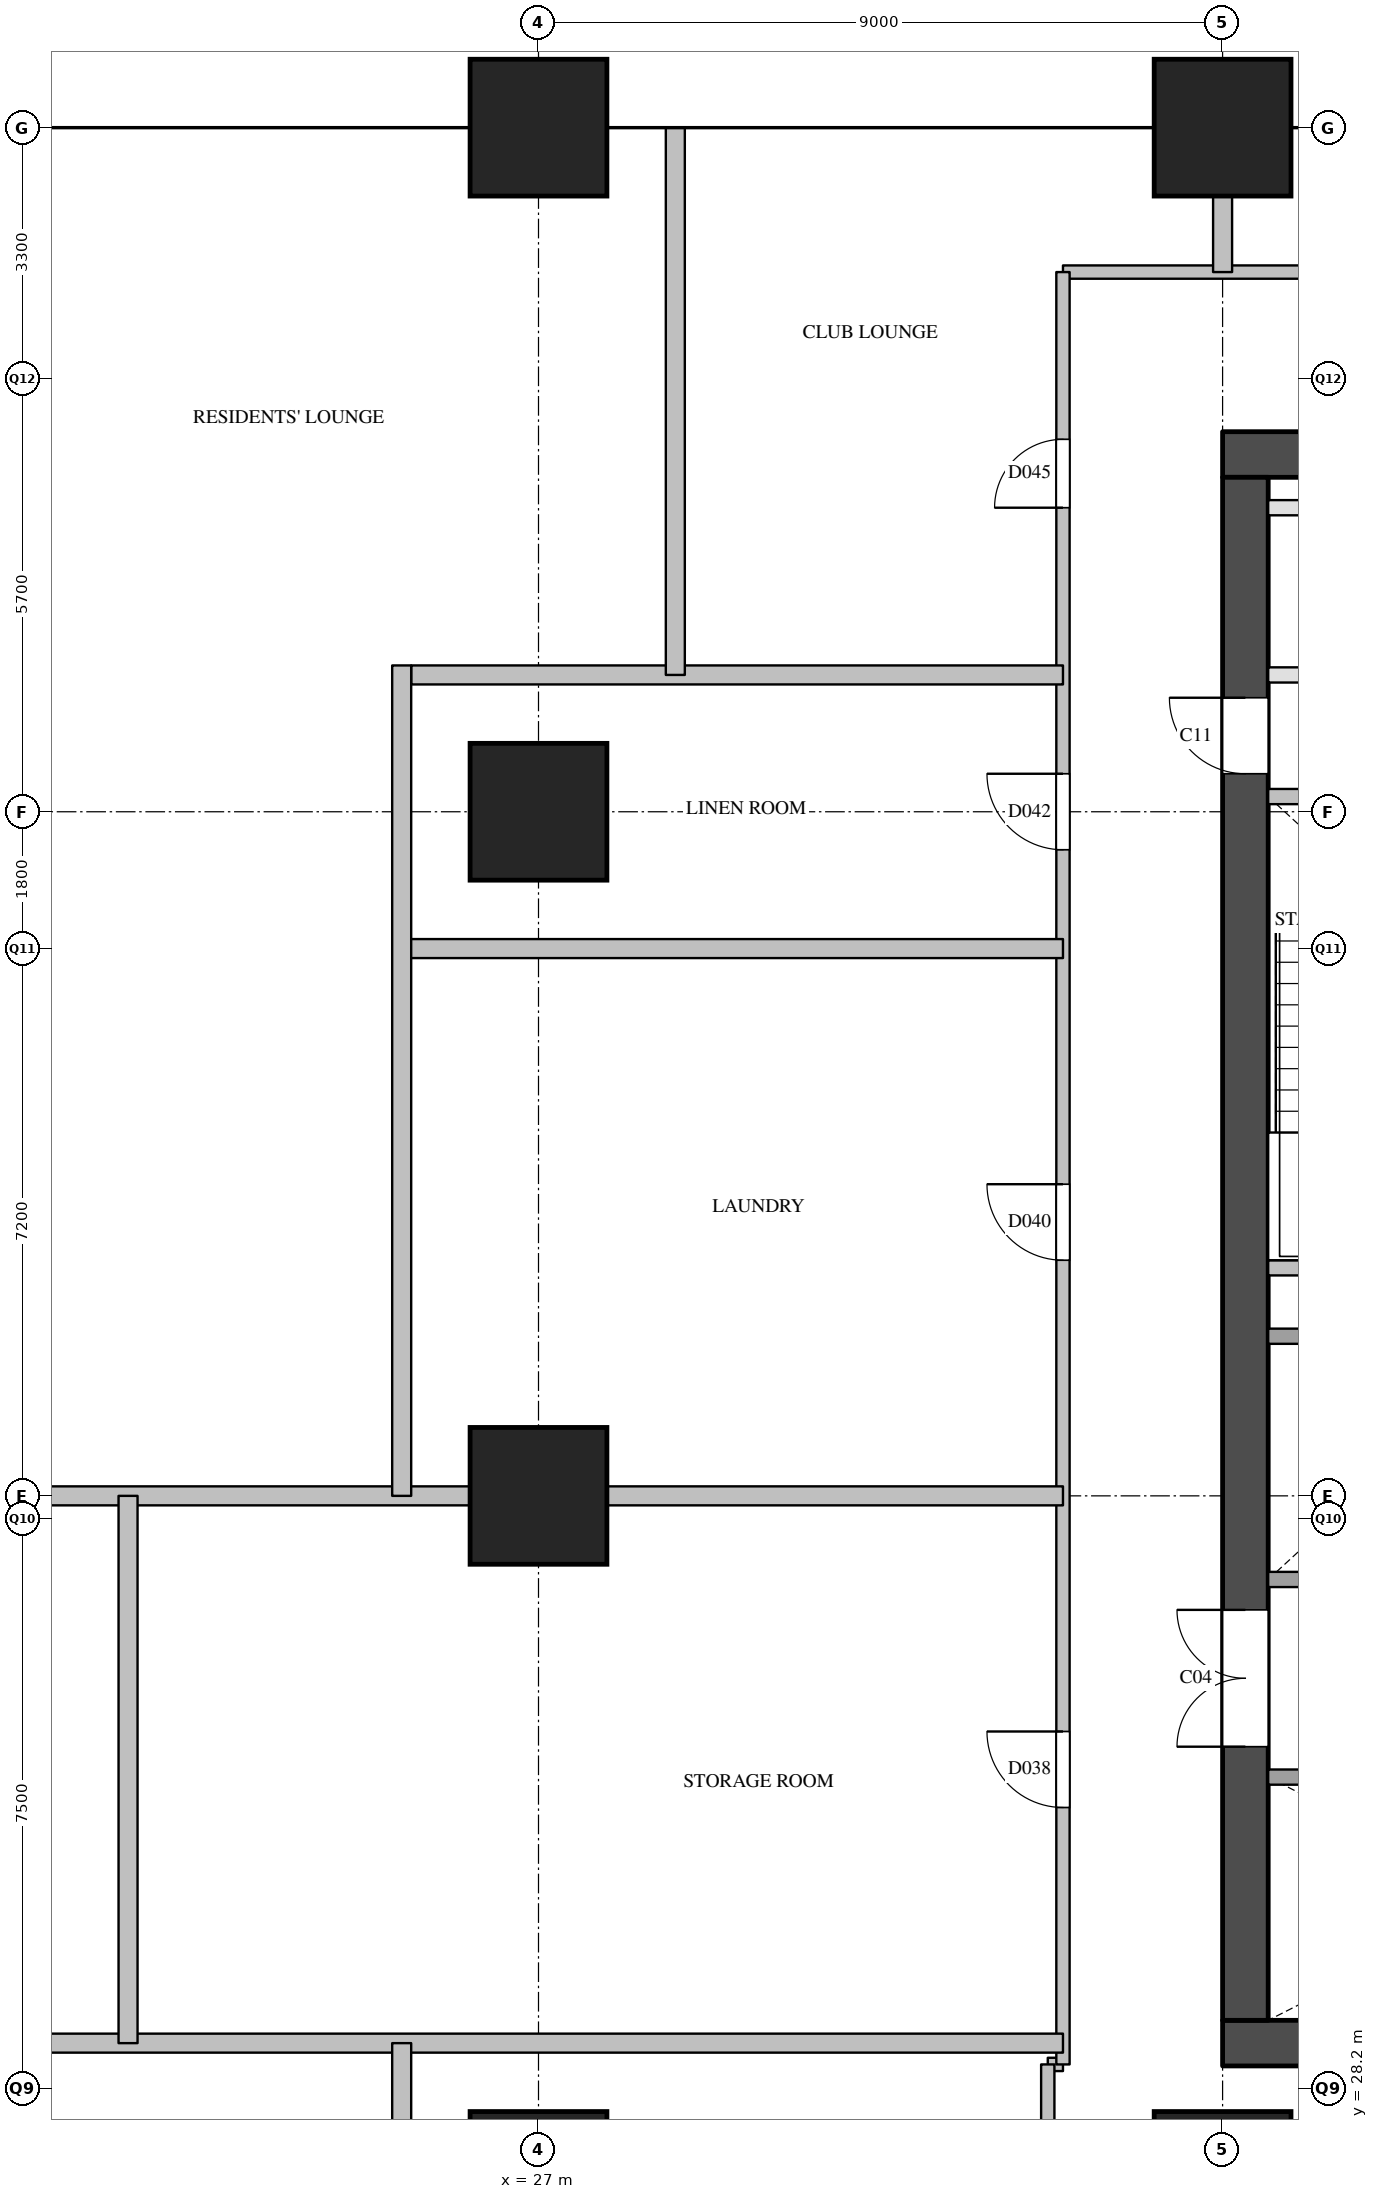
"""IFC4 building model, lengths in metres.
Left out: names, types, materials, properties, quantities, classifications, styles, units other than length and angle.
Written with IfcOpenShell. Run it as: python <this file> out.ifc"""

import sys

from ifc_helpers import new_model, si_unit, direction, frame, frame_2d, origin, origin_2d, place, context, subcontext, project, spatial, rectangle, extrude, element, fill, save


model = new_model("IFC4")
c1 = context("Model", 3, precision=1e-05, world=origin(), true_north=direction((0.0, 1.0)))
c2 = subcontext(c1, "Body", "Model", "MODEL_VIEW")
j1 = project(units=[si_unit("LENGTHUNIT", "METRE"), si_unit("PLANEANGLEUNIT", "RADIAN")], contexts=[c1])
p1 = place(None, origin())
s1 = spatial("IfcSite", under=j1, at=p1, CompositionType="ELEMENT")
p2 = place(p1, origin())
s2 = spatial("IfcBuilding", under=s1, at=p2, CompositionType="ELEMENT")
p3 = place(p2, frame((0.0, 0.0, 69.0)))
s3 = spatial("IfcBuildingStorey", under=s2, at=p3, CompositionType="ELEMENT", Elevation=69.0)
for number, where, z_axis, x_axis in (
    (1, (27.0, 27.0, 0.0), (0.0, 0.0, 1.0), (1.0, 0.0, 0.0)),
    (2, (27.0, 36.0, 0.0), (0.0, 0.0, 1.0), (1.0, 0.0, 0.0)),
    (3, (27.0, 45.0, 0.0), (0.0, 0.0, 1.0), (1.0, 0.0, 0.0)),
    (4, (27.0, 54.0, 0.0), (0.0, 0.0, 1.0), (1.0, 0.0, 0.0)),
    (5, (36.0, 27.0, 0.0), (0.0, 0.0, 1.0), (1.0, 0.0, 0.0)),
    (6, (36.0, 54.0, 0.0), (0.0, 0.0, 1.0), (1.0, 0.0, 0.0)),
):
    element("IfcColumn", number, at=place(p3, frame(where, z_axis=z_axis, x_axis=x_axis)), inside=s3, PredefinedType="COLUMN", context=c2, shape_type="SweptSolid", body=[
        extrude(rectangle(XDim=1.8, YDim=1.8, at=origin_2d()), origin(), (0.0, 0.0, 1.0), 3.8),
    ])
for number, where, z_axis, x_axis in (
    (7, (36.0, 28.8, 0.0), (0.0, 0.0, 1.0), (1.0, 0.0, 0.0)),
    (8, (36.0, 49.7, 0.0), (0.0, 0.0, 1.0), (1.0, 0.0, 0.0)),
):
    element("IfcWall", number, at=place(p3, frame(where, z_axis=z_axis, x_axis=x_axis)), inside=s3, PredefinedType="SHEAR", context=c2, shape_type="SweptSolid", body=[
        extrude(rectangle(XDim=12.4, YDim=0.6, at=frame_2d((6.2, 0.0))), origin(), (0.0, 0.0, 1.0), 3.5),
    ])
p4 = place(p3, frame((36.3, 29.1, 0.0), z_axis=(0.0, 0.0, 1.0), x_axis=(0.0, 1.0, 0.0)))
e9 = element("IfcWall", 9, at=p4, inside=s3, PredefinedType="SHEAR", context=c2, shape_type="SweptSolid", body=[
    extrude(rectangle(XDim=20.3, YDim=0.6, at=frame_2d((10.15, 0.0))), origin(), (0.0, 0.0, 1.0), 3.5),
])
p5 = place(p4, frame((3.6, 0.0, 0.0)))
e10 = element("IfcOpeningElement", 10, at=p5, cuts=e9, PredefinedType="OPENING", context=c2, shape_type="SweptSolid", body=[
    extrude(rectangle(XDim=1.8, YDim=2.1, at=frame_2d((0.9, 1.05))), frame((0.0, 0.31, 0.0), z_axis=(0.0, -1.0, 0.0), x_axis=(1.0, 0.0, 0.0)), (0.0, 0.0, 1.0), 0.62),
])
p6 = place(p4, frame((16.4, 0.0, 0.0)))
e11 = element("IfcOpeningElement", 11, at=p6, cuts=e9, PredefinedType="OPENING", context=c2, shape_type="SweptSolid", body=[
    extrude(rectangle(XDim=1.0, YDim=2.1, at=frame_2d((0.5, 1.05))), frame((0.0, 0.31, 0.0), z_axis=(0.0, -1.0, 0.0), x_axis=(1.0, 0.0, 0.0)), (0.0, 0.0, 1.0), 0.62),
])
p7 = place(p3, frame((36.6, 32.3, 0.0), z_axis=(0.0, 0.0, 1.0), x_axis=(1.0, 0.0, 0.0)))
e12 = element("IfcWall", 12, at=p7, inside=s3, PredefinedType="SOLIDWALL", context=c2, shape_type="SweptSolid", body=[
    extrude(rectangle(XDim=11.2, YDim=0.2, at=frame_2d((5.6, 0.0))), origin(), (0.0, 0.0, 1.0), 3.5),
])
p8 = place(p7, frame((7.225, 0.0, 0.0)))
e13 = element("IfcOpeningElement", 13, at=p8, cuts=e12, PredefinedType="OPENING", context=c2, shape_type="SweptSolid", body=[
    extrude(rectangle(XDim=1.2, YDim=2.1, at=frame_2d((0.6, 1.05))), frame((0.0, 0.11, 0.0), z_axis=(0.0, -1.0, 0.0), x_axis=(1.0, 0.0, 0.0)), (0.0, 0.0, 1.0), 0.22),
])
p9 = place(p7, frame((9.475, 0.0, 0.0)))
e14 = element("IfcOpeningElement", 14, at=p9, cuts=e12, PredefinedType="OPENING", context=c2, shape_type="SweptSolid", body=[
    extrude(rectangle(XDim=1.2, YDim=2.1, at=frame_2d((0.6, 1.05))), frame((0.0, 0.11, 0.0), z_axis=(0.0, -1.0, 0.0), x_axis=(1.0, 0.0, 0.0)), (0.0, 0.0, 1.0), 0.22),
])
p10 = place(p3, frame((36.6, 34.9, 0.0), z_axis=(0.0, 0.0, 1.0), x_axis=(1.0, 0.0, 0.0)))
e15 = element("IfcWall", 15, at=p10, inside=s3, PredefinedType="SOLIDWALL", context=c2, shape_type="SweptSolid", body=[
    extrude(rectangle(XDim=6.3, YDim=0.2, at=frame_2d((3.15, 0.0))), origin(), (0.0, 0.0, 1.0), 3.5),
])
p11 = place(p3, frame((36.6, 38.1, 0.0), z_axis=(0.0, 0.0, 1.0), x_axis=(1.0, 0.0, 0.0)))
e16 = element("IfcWall", 16, at=p11, inside=s3, PredefinedType="SOLIDWALL", context=c2, shape_type="SweptSolid", body=[
    extrude(rectangle(XDim=6.7, YDim=0.2, at=frame_2d((3.35, 0.0))), origin(), (0.0, 0.0, 1.0), 3.5),
])
p12 = place(p3, frame((36.6, 39.0, 0.0), z_axis=(0.0, 0.0, 1.0), x_axis=(1.0, 0.0, 0.0)))
e17 = element("IfcWall", 17, at=p12, inside=s3, PredefinedType="SOLIDWALL", context=c2, shape_type="SweptSolid", body=[
    extrude(rectangle(XDim=3.25, YDim=0.2, at=frame_2d((1.625, 0.0))), origin(), (0.0, 0.0, 1.0), 3.5),
])
p13 = place(p3, frame((36.6, 45.2, 0.0), z_axis=(0.0, 0.0, 1.0), x_axis=(1.0, 0.0, 0.0)))
e18 = element("IfcWall", 18, at=p13, inside=s3, PredefinedType="SOLIDWALL", context=c2, shape_type="SweptSolid", body=[
    extrude(rectangle(XDim=10.05, YDim=0.2, at=frame_2d((5.025, 0.0))), origin(), (0.0, 0.0, 1.0), 3.5),
])
p14 = place(p13, frame((1.125, 0.0, 0.0)))
e19 = element("IfcOpeningElement", 19, at=p14, cuts=e18, PredefinedType="OPENING", context=c2, shape_type="SweptSolid", body=[
    extrude(rectangle(XDim=1.1, YDim=2.1, at=frame_2d((0.55, 1.05))), frame((0.0, 0.11, 0.0), z_axis=(0.0, -1.0, 0.0), x_axis=(1.0, 0.0, 0.0)), (0.0, 0.0, 1.0), 0.22),
])
p15 = place(p13, frame((4.475, 0.0, 0.0)))
e20 = element("IfcOpeningElement", 20, at=p15, cuts=e18, PredefinedType="OPENING", context=c2, shape_type="SweptSolid", body=[
    extrude(rectangle(XDim=1.1, YDim=2.1, at=frame_2d((0.55, 1.05))), frame((0.0, 0.11, 0.0), z_axis=(0.0, -1.0, 0.0), x_axis=(1.0, 0.0, 0.0)), (0.0, 0.0, 1.0), 0.22),
])
p16 = place(p13, frame((7.825, 0.0, 0.0)))
e21 = element("IfcOpeningElement", 21, at=p16, cuts=e18, PredefinedType="OPENING", context=c2, shape_type="SweptSolid", body=[
    extrude(rectangle(XDim=1.1, YDim=2.1, at=frame_2d((0.55, 1.05))), frame((0.0, 0.11, 0.0), z_axis=(0.0, -1.0, 0.0), x_axis=(1.0, 0.0, 0.0)), (0.0, 0.0, 1.0), 0.22),
])
p17 = place(p3, frame((36.6, 46.8, 0.0), z_axis=(0.0, 0.0, 1.0), x_axis=(1.0, 0.0, 0.0)))
e22 = element("IfcWall", 22, at=p17, inside=s3, PredefinedType="PARTITIONING", context=c2, shape_type="SweptSolid", body=[
    extrude(rectangle(XDim=11.2, YDim=0.2, at=frame_2d((5.6, 0.0))), origin(), (0.0, 0.0, 1.0), 3.5),
])
p18 = place(p17, frame((2.07, 0.0, 0.0)))
e23 = element("IfcOpeningElement", 23, at=p18, cuts=e22, PredefinedType="OPENING", context=c2, shape_type="SweptSolid", body=[
    extrude(rectangle(XDim=0.9, YDim=2.1, at=frame_2d((0.45, 1.05))), frame((0.0, 0.11, 0.0), z_axis=(0.0, -1.0, 0.0), x_axis=(1.0, 0.0, 0.0)), (0.0, 0.0, 1.0), 0.22),
])
p19 = place(p17, frame((7.67, 0.0, 0.0)))
e24 = element("IfcOpeningElement", 24, at=p19, cuts=e22, PredefinedType="OPENING", context=c2, shape_type="SweptSolid", body=[
    extrude(rectangle(XDim=0.9, YDim=2.1, at=frame_2d((0.45, 1.05))), frame((0.0, 0.11, 0.0), z_axis=(0.0, -1.0, 0.0), x_axis=(1.0, 0.0, 0.0)), (0.0, 0.0, 1.0), 0.22),
])
p20 = place(p3, frame((36.6, 49.0, 0.0), z_axis=(0.0, 0.0, 1.0), x_axis=(1.0, 0.0, 0.0)))
e25 = element("IfcWall", 25, at=p20, inside=s3, PredefinedType="PARTITIONING", context=c2, shape_type="SweptSolid", body=[
    extrude(rectangle(XDim=11.2, YDim=0.2, at=frame_2d((5.6, 0.0))), origin(), (0.0, 0.0, 1.0), 3.5),
])
p21 = place(p3, frame((33.7, 28.52, 0.0), z_axis=(0.0, 0.0, 1.0), x_axis=(1.0, 0.0, 0.0)))
e26 = element("IfcWall", 26, at=p21, inside=s3, PredefinedType="PARTITIONING", context=c2, shape_type="SweptSolid", body=[
    extrude(rectangle(XDim=0.2, YDim=0.175, at=frame_2d((0.1, 0.0))), origin(), (0.0, 0.0, 1.0), 3.5),
])
p22 = place(p3, frame((33.9, 52.1, 0.0), z_axis=(0.0, 0.0, 1.0), x_axis=(1.0, 0.0, 0.0)))
e27 = element("IfcWall", 27, at=p22, inside=s3, PredefinedType="PARTITIONING", context=c2, shape_type="SweptSolid", body=[
    extrude(rectangle(XDim=16.6, YDim=0.175, at=frame_2d((8.3, 0.0))), origin(), (0.0, 0.0, 1.0), 3.5),
])
p23 = place(p22, frame((7.702, 0.0, 0.0)))
e28 = element("IfcOpeningElement", 28, at=p23, cuts=e27, PredefinedType="OPENING", context=c2, shape_type="SweptSolid", body=[
    extrude(rectangle(XDim=0.9, YDim=2.1, at=frame_2d((0.45, 1.05))), frame((0.0, 0.097, 0.0), z_axis=(0.0, -1.0, 0.0), x_axis=(1.0, 0.0, 0.0)), (0.0, 0.0, 1.0), 0.195),
])
p24 = place(p3, frame((33.7, 24.59, 0.0), z_axis=(0.0, 0.0, 1.0), x_axis=(0.0, 1.0, 0.0)))
e29 = element("IfcWall", 29, at=p24, inside=s3, PredefinedType="PARTITIONING", context=c2, shape_type="SweptSolid", body=[
    extrude(rectangle(XDim=3.93, YDim=0.175, at=frame_2d((1.965, 0.0))), origin(), (0.0, 0.0, 1.0), 2.5),
])
p25 = place(p24, frame((1.515, 0.0, 0.0)))
e30 = element("IfcOpeningElement", 30, at=p25, cuts=e29, PredefinedType="OPENING", context=c2, shape_type="SweptSolid", body=[
    extrude(rectangle(XDim=0.9, YDim=2.1, at=frame_2d((0.45, 1.05))), frame((0.0, 0.097, 0.0), z_axis=(0.0, -1.0, 0.0), x_axis=(1.0, 0.0, 0.0)), (0.0, 0.0, 1.0), 0.195),
])
p26 = place(p3, frame((33.9, 28.52, 0.0), z_axis=(0.0, 0.0, 1.0), x_axis=(0.0, 1.0, 0.0)))
e31 = element("IfcWall", 31, at=p26, inside=s3, PredefinedType="PARTITIONING", context=c2, shape_type="SweptSolid", body=[
    extrude(rectangle(XDim=23.58, YDim=0.175, at=frame_2d((11.79, 0.0))), origin(), (0.0, 0.0, 1.0), 3.5),
])
p27 = place(p26, frame((3.38, 0.0, 0.0)))
e32 = element("IfcOpeningElement", 32, at=p27, cuts=e31, PredefinedType="OPENING", context=c2, shape_type="SweptSolid", body=[
    extrude(rectangle(XDim=1.0, YDim=2.1, at=frame_2d((0.5, 1.05))), frame((0.0, 0.097, 0.0), z_axis=(0.0, -1.0, 0.0), x_axis=(1.0, 0.0, 0.0)), (0.0, 0.0, 1.0), 0.195),
])
p28 = place(p26, frame((10.58, 0.0, 0.0)))
e33 = element("IfcOpeningElement", 33, at=p28, cuts=e31, PredefinedType="OPENING", context=c2, shape_type="SweptSolid", body=[
    extrude(rectangle(XDim=1.0, YDim=2.1, at=frame_2d((0.5, 1.05))), frame((0.0, 0.097, 0.0), z_axis=(0.0, -1.0, 0.0), x_axis=(1.0, 0.0, 0.0)), (0.0, 0.0, 1.0), 0.195),
])
p29 = place(p26, frame((15.98, 0.0, 0.0)))
e34 = element("IfcOpeningElement", 34, at=p29, cuts=e31, PredefinedType="OPENING", context=c2, shape_type="SweptSolid", body=[
    extrude(rectangle(XDim=1.0, YDim=2.1, at=frame_2d((0.5, 1.05))), frame((0.0, 0.097, 0.0), z_axis=(0.0, -1.0, 0.0), x_axis=(1.0, 0.0, 0.0)), (0.0, 0.0, 1.0), 0.195),
])
p30 = place(p26, frame((20.48, 0.0, 0.0)))
e35 = element("IfcOpeningElement", 35, at=p30, cuts=e31, PredefinedType="OPENING", context=c2, shape_type="SweptSolid", body=[
    extrude(rectangle(XDim=0.9, YDim=2.1, at=frame_2d((0.45, 1.05))), frame((0.0, 0.097, 0.0), z_axis=(0.0, -1.0, 0.0), x_axis=(1.0, 0.0, 0.0)), (0.0, 0.0, 1.0), 0.195),
])
p31 = place(p3, frame((20.1, 28.8, 0.0), z_axis=(0.0, 0.0, 1.0), x_axis=(1.0, 0.0, 0.0)))
e36 = element("IfcWall", 36, at=p31, inside=s3, PredefinedType="PARTITIONING", context=c2, shape_type="SweptSolid", body=[
    extrude(rectangle(XDim=13.8, YDim=0.25, at=frame_2d((6.9, 0.0))), origin(), (0.0, 0.0, 1.0), 2.5),
])
p32 = place(p3, frame((20.1, 36.0, 0.0), z_axis=(0.0, 0.0, 1.0), x_axis=(1.0, 0.0, 0.0)))
e37 = element("IfcWall", 37, at=p32, inside=s3, PredefinedType="PARTITIONING", context=c2, shape_type="SweptSolid", body=[
    extrude(rectangle(XDim=13.8, YDim=0.25, at=frame_2d((6.9, 0.0))), origin(), (0.0, 0.0, 1.0), 3.5),
])
p33 = place(p3, frame((25.2, 43.2, 0.0), z_axis=(0.0, 0.0, 1.0), x_axis=(1.0, 0.0, 0.0)))
e38 = element("IfcWall", 38, at=p33, inside=s3, PredefinedType="PARTITIONING", context=c2, shape_type="SweptSolid", body=[
    extrude(rectangle(XDim=8.7, YDim=0.25, at=frame_2d((4.35, 0.0))), origin(), (0.0, 0.0, 1.0), 2.5),
])
p34 = place(p3, frame((25.325, 46.8, 0.0), z_axis=(0.0, 0.0, 1.0), x_axis=(1.0, 0.0, 0.0)))
e39 = element("IfcWall", 39, at=p34, inside=s3, PredefinedType="PARTITIONING", context=c2, shape_type="SweptSolid", body=[
    extrude(rectangle(XDim=8.575, YDim=0.25, at=frame_2d((4.288, 0.0))), origin(), (0.0, 0.0, 1.0), 2.5),
])
p35 = place(p3, frame((21.6, 28.8, 0.0), z_axis=(0.0, 0.0, 1.0), x_axis=(0.0, 1.0, 0.0)))
e40 = element("IfcWall", 40, at=p35, inside=s3, PredefinedType="PARTITIONING", context=c2, shape_type="SweptSolid", body=[
    extrude(rectangle(XDim=7.2, YDim=0.25, at=frame_2d((3.6, 0.0))), origin(), (0.0, 0.0, 1.0), 3.5),
])
p36 = place(p3, frame((25.2, 18.0, 0.0), z_axis=(0.0, 0.0, 1.0), x_axis=(0.0, 1.0, 0.0)))
e41 = element("IfcWall", 41, at=p36, inside=s3, PredefinedType="PARTITIONING", context=c2, shape_type="SweptSolid", body=[
    extrude(rectangle(XDim=10.8, YDim=0.25, at=frame_2d((5.4, 0.0))), origin(), (0.0, 0.0, 1.0), 2.5),
])
p37 = place(p3, frame((25.2, 36.0, 0.0), z_axis=(0.0, 0.0, 1.0), x_axis=(0.0, 1.0, 0.0)))
e42 = element("IfcWall", 42, at=p37, inside=s3, PredefinedType="PARTITIONING", context=c2, shape_type="SweptSolid", body=[
    extrude(rectangle(XDim=10.925, YDim=0.25, at=frame_2d((5.462, 0.0))), origin(), (0.0, 0.0, 1.0), 3.5),
])
p38 = place(p3, frame((28.8, 46.8, 0.0), z_axis=(0.0, 0.0, 1.0), x_axis=(0.0, 1.0, 0.0)))
e43 = element("IfcWall", 43, at=p38, inside=s3, PredefinedType="PARTITIONING", context=c2, shape_type="SweptSolid", body=[
    extrude(rectangle(XDim=7.2, YDim=0.25, at=frame_2d((3.6, 0.0))), origin(), (0.0, 0.0, 1.0), 2.5),
])
p39 = place(p3, frame((36.0, 52.1, 0.0), z_axis=(0.0, 0.0, 1.0), x_axis=(0.0, 1.0, 0.0)))
e44 = element("IfcWall", 44, at=p39, inside=s3, PredefinedType="PARTITIONING", context=c2, shape_type="SweptSolid", body=[
    extrude(rectangle(XDim=1.9, YDim=0.25, at=frame_2d((0.95, 0.0))), origin(), (0.0, 0.0, 1.0), 3.5),
])
p40 = place(p5, origin())
e45 = element("IfcDoor", 45, at=p40, inside=s3, OperationType="DOUBLE_DOOR_SINGLE_SWING", PredefinedType="DOOR", context=c2, shape_type="SweptSolid", body=[
    extrude(rectangle(XDim=1.8, YDim=2.1, at=frame_2d((0.9, 1.05))), frame((0.0, 0.025, 0.0), z_axis=(0.0, -1.0, 0.0), x_axis=(1.0, 0.0, 0.0)), (0.0, 0.0, 1.0), 0.05),
])
fill(e10, e45)
p41 = place(p6, origin())
e46 = element("IfcDoor", 46, at=p41, inside=s3, OperationType="SINGLE_SWING_RIGHT", PredefinedType="DOOR", context=c2, shape_type="SweptSolid", body=[
    extrude(rectangle(XDim=1.0, YDim=2.1, at=frame_2d((0.5, 1.05))), frame((0.0, 0.025, 0.0), z_axis=(0.0, -1.0, 0.0), x_axis=(1.0, 0.0, 0.0)), (0.0, 0.0, 1.0), 0.05),
])
fill(e11, e46)
p42 = place(p27, origin())
e47 = element("IfcDoor", 47, at=p42, inside=s3, OperationType="SINGLE_SWING_RIGHT", PredefinedType="DOOR", context=c2, shape_type="SweptSolid", body=[
    extrude(rectangle(XDim=1.0, YDim=2.1, at=frame_2d((0.5, 1.05))), frame((0.0, 0.025, 0.0), z_axis=(0.0, -1.0, 0.0), x_axis=(1.0, 0.0, 0.0)), (0.0, 0.0, 1.0), 0.05),
])
fill(e32, e47)
p43 = place(p28, origin())
e48 = element("IfcDoor", 48, at=p43, inside=s3, OperationType="SINGLE_SWING_RIGHT", PredefinedType="DOOR", context=c2, shape_type="SweptSolid", body=[
    extrude(rectangle(XDim=1.0, YDim=2.1, at=frame_2d((0.5, 1.05))), frame((0.0, 0.025, 0.0), z_axis=(0.0, -1.0, 0.0), x_axis=(1.0, 0.0, 0.0)), (0.0, 0.0, 1.0), 0.05),
])
fill(e33, e48)
p44 = place(p29, origin())
e49 = element("IfcDoor", 49, at=p44, inside=s3, OperationType="SINGLE_SWING_RIGHT", PredefinedType="DOOR", context=c2, shape_type="SweptSolid", body=[
    extrude(rectangle(XDim=1.0, YDim=2.1, at=frame_2d((0.5, 1.05))), frame((0.0, 0.025, 0.0), z_axis=(0.0, -1.0, 0.0), x_axis=(1.0, 0.0, 0.0)), (0.0, 0.0, 1.0), 0.05),
])
fill(e34, e49)
p45 = place(p30, origin())
e50 = element("IfcDoor", 50, at=p45, inside=s3, OperationType="SINGLE_SWING_LEFT", PredefinedType="DOOR", context=c2, shape_type="SweptSolid", body=[
    extrude(rectangle(XDim=0.9, YDim=2.1, at=frame_2d((0.45, 1.05))), frame((0.0, 0.025, 0.0), z_axis=(0.0, -1.0, 0.0), x_axis=(1.0, 0.0, 0.0)), (0.0, 0.0, 1.0), 0.05),
])
fill(e35, e50)
save(model, sys.argv[1])
